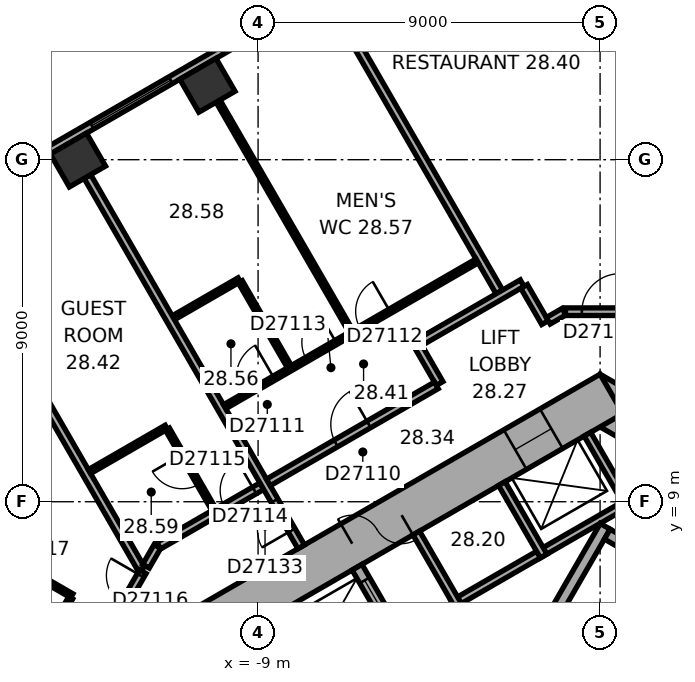
"""IFC4 building model, lengths in metres.
Left out: names, types, materials, properties, quantities, classifications, styles, units other than length and angle.
Written with IfcOpenShell. Run it as: python <this file> out.ifc"""

import sys

from ifc_helpers import new_model, si_unit, direction, frame, frame_2d, origin, origin_2d, place, context, subcontext, project, spatial, rectangle, extrude, element, fill, save


model = new_model("IFC4")
c1 = context("Model", 3, precision=1e-05, world=origin(), true_north=direction((0.0, 1.0)))
c2 = subcontext(c1, "Body", "Model", "MODEL_VIEW")
j1 = project(units=[si_unit("LENGTHUNIT", "METRE"), si_unit("PLANEANGLEUNIT", "RADIAN")], contexts=[c1])
p1 = place(None, origin())
s1 = spatial("IfcSite", under=j1, at=p1, CompositionType="ELEMENT")
p2 = place(p1, origin())
s2 = spatial("IfcBuilding", under=s1, at=p2, CompositionType="ELEMENT")
p3 = place(p2, frame((0.0, 0.0, 116.6)))
s3 = spatial("IfcBuildingStorey", under=s2, at=p3, CompositionType="ELEMENT", Elevation=116.6)
for number, where, z_axis, x_axis in (
    (1, (-10.333, 19.957, 0.0), (0.0, 0.0, 1.0), (-0.866, -0.5, 0.0)),
    (2, (-13.74, 17.99, 0.0), (0.0, 0.0, 1.0), (-0.866, -0.5, 0.0)),
):
    element("IfcColumn", number, at=place(p3, frame(where, z_axis=z_axis, x_axis=x_axis)), inside=s3, PredefinedType="COLUMN", context=c2, shape_type="SweptSolid", body=[
        extrude(rectangle(XDim=1.1, YDim=1.0, at=origin_2d()), origin(), (0.0, 0.0, 1.0), 3.3),
    ])
p4 = place(p3, frame((10.4, 5.658, 0.0), z_axis=(0.0, 0.0, 1.0), x_axis=(-0.866021384402, 0.500006961711, 0.0)))
e3 = element("IfcWall", 3, at=p4, inside=s3, PredefinedType="SHEAR", context=c2, shape_type="SweptSolid", body=[
    extrude(rectangle(XDim=12.355, YDim=1.2, at=frame_2d((6.178, 0.0))), origin(), (0.0, 0.0, 1.0), 3.3),
])
p5 = place(p4, frame((2.728, 0.0, 0.0)))
e4 = element("IfcOpeningElement", 4, at=p5, cuts=e3, PredefinedType="OPENING", context=c2, shape_type="SweptSolid", body=[
    extrude(rectangle(XDim=1.1, YDim=2.1, at=frame_2d((0.55, 1.05))), frame((0.0, 0.61, 0.0), z_axis=(0.0, -1.0, 0.0), x_axis=(1.0, 0.0, 0.0)), (0.0, 0.0, 1.0), 1.22),
])
p6 = place(p4, frame((5.328, 0.0, 0.0)))
e5 = element("IfcOpeningElement", 5, at=p6, cuts=e3, PredefinedType="OPENING", context=c2, shape_type="SweptSolid", body=[
    extrude(rectangle(XDim=1.1, YDim=2.1, at=frame_2d((0.55, 1.05))), frame((0.0, 0.61, 0.0), z_axis=(0.0, -1.0, 0.0), x_axis=(1.0, 0.0, 0.0)), (0.0, 0.0, 1.0), 1.22),
])
p7 = place(p4, frame((7.928, 0.0, 0.0)))
e6 = element("IfcOpeningElement", 6, at=p7, cuts=e3, PredefinedType="OPENING", context=c2, shape_type="SweptSolid", body=[
    extrude(rectangle(XDim=1.1, YDim=2.1, at=frame_2d((0.55, 1.05))), frame((0.0, 0.61, 0.0), z_axis=(0.0, -1.0, 0.0), x_axis=(1.0, 0.0, 0.0)), (0.0, 0.0, 1.0), 1.22),
])
p8 = place(p3, frame((0.3, 11.836, 0.0), z_axis=(0.0, 0.0, 1.0), x_axis=(-0.866021384402, -0.500006961711, 0.0)))
e7 = element("IfcWall", 7, at=p8, inside=s3, PredefinedType="SHEAR", context=c2, shape_type="SweptSolid", body=[
    extrude(rectangle(XDim=12.355, YDim=1.2, at=frame_2d((6.178, 0.0))), origin(), (0.0, 0.0, 1.0), 3.3),
])
p9 = place(p8, frame((6.378, 0.0, 0.0)))
e8 = element("IfcOpeningElement", 8, at=p9, cuts=e7, PredefinedType="OPENING", context=c2, shape_type="SweptSolid", body=[
    extrude(rectangle(XDim=1.5, YDim=2.1, at=frame_2d((0.75, 1.05))), frame((0.0, 0.61, 0.0), z_axis=(0.0, -1.0, 0.0), x_axis=(1.0, 0.0, 0.0)), (0.0, 0.0, 1.0), 1.22),
])
p10 = place(p8, frame((1.828, 0.0, 0.0)))
e9 = element("IfcOpeningElement", 9, at=p10, cuts=e7, PredefinedType="OPENING", context=c2, shape_type="SweptSolid", body=[
    extrude(rectangle(XDim=1.1, YDim=2.1, at=frame_2d((0.55, 1.05))), frame((0.0, 0.61, 0.0), z_axis=(0.0, -1.0, 0.0), x_axis=(1.0, 0.0, 0.0)), (0.0, 0.0, 1.0), 1.22),
])
p11 = place(p3, frame((-3.136, 24.805, 0.0), z_axis=(0.0, 0.0, 1.0), x_axis=(-0.866028291626, -0.499994998079, 0.0)))
e10 = element("IfcWall", 10, at=p11, inside=s3, PredefinedType="STANDARD", context=c2, shape_type="SweptSolid", body=[
    extrude(rectangle(XDim=21.246, YDim=0.2, at=frame_2d((10.623, 0.0))), origin(), (0.0, 0.0, 1.0), 3.3),
])
p12 = place(p11, frame((1.555, 0.0, 0.8)))
e11 = element("IfcOpeningElement", 11, at=p12, cuts=e10, PredefinedType="OPENING", context=c2, shape_type="SweptSolid", body=[
    extrude(rectangle(XDim=2.4, YDim=1.7, at=frame_2d((1.2, 0.85))), frame((0.0, 0.11, 0.0), z_axis=(0.0, -1.0, 0.0), x_axis=(1.0, 0.0, 0.0)), (0.0, 0.0, 1.0), 0.22),
])
p13 = place(p11, frame((5.489, 0.0, 0.8)))
e12 = element("IfcOpeningElement", 12, at=p13, cuts=e10, PredefinedType="OPENING", context=c2, shape_type="SweptSolid", body=[
    extrude(rectangle(XDim=2.4, YDim=1.7, at=frame_2d((1.2, 0.85))), frame((0.0, 0.11, 0.0), z_axis=(0.0, -1.0, 0.0), x_axis=(1.0, 0.0, 0.0)), (0.0, 0.0, 1.0), 0.22),
])
p14 = place(p11, frame((9.424, 0.0, 0.8)))
e13 = element("IfcOpeningElement", 13, at=p14, cuts=e10, PredefinedType="OPENING", context=c2, shape_type="SweptSolid", body=[
    extrude(rectangle(XDim=2.4, YDim=1.7, at=frame_2d((1.2, 0.85))), frame((0.0, 0.11, 0.0), z_axis=(0.0, -1.0, 0.0), x_axis=(1.0, 0.0, 0.0)), (0.0, 0.0, 1.0), 0.22),
])
p15 = place(p11, frame((13.358, 0.0, 0.8)))
e14 = element("IfcOpeningElement", 14, at=p15, cuts=e10, PredefinedType="OPENING", context=c2, shape_type="SweptSolid", body=[
    extrude(rectangle(XDim=2.4, YDim=1.7, at=frame_2d((1.2, 0.85))), frame((0.0, 0.11, 0.0), z_axis=(0.0, -1.0, 0.0), x_axis=(1.0, 0.0, 0.0)), (0.0, 0.0, 1.0), 0.22),
])
p16 = place(p11, frame((17.293, 0.0, 0.8)))
e15 = element("IfcOpeningElement", 15, at=p16, cuts=e10, PredefinedType="OPENING", context=c2, shape_type="SweptSolid", body=[
    extrude(rectangle(XDim=2.4, YDim=1.7, at=frame_2d((1.2, 0.85))), frame((0.0, 0.11, 0.0), z_axis=(0.0, -1.0, 0.0), x_axis=(1.0, 0.0, 0.0)), (0.0, 0.0, 1.0), 0.22),
])
p17 = place(p3, frame((0.803, 9.009, 0.0), z_axis=(0.0, 0.0, 1.0), x_axis=(-0.866028230842, -0.499995103361, 0.0)))
e16 = element("IfcWall", 16, at=p17, inside=s3, PredefinedType="PARTITIONING", context=c2, shape_type="SweptSolid", body=[
    extrude(rectangle(XDim=5.4, YDim=0.2, at=frame_2d((2.7, 0.0))), origin(), (0.0, 0.0, 1.0), 2.95),
])
p18 = place(p3, frame((0.767, 8.872, 0.0), z_axis=(0.0, 0.0, 1.0), x_axis=(-0.499994660107, 0.866028486751, 0.0)))
e17 = element("IfcWall", 17, at=p18, inside=s3, PredefinedType="PARTITIONING", context=c2, shape_type="SweptSolid", body=[
    extrude(rectangle(XDim=2.2, YDim=0.2, at=frame_2d((1.1, 0.0))), origin(), (0.0, 0.0, 1.0), 2.95),
])
for number, where, z_axis, x_axis in (
    (18, (-1.485, 7.572, 0.0), (0.0, 0.0, 1.0), (-0.5, 0.866, 0.0)),
    (19, (-3.737, 6.272, 0.0), (0.0, 0.0, 1.0), (-0.5, 0.866, 0.0)),
):
    element("IfcWall", number, at=place(p3, frame(where, z_axis=z_axis, x_axis=x_axis)), inside=s3, PredefinedType="PARTITIONING", context=c2, shape_type="SweptSolid", body=[
        extrude(rectangle(XDim=2.2, YDim=0.2, at=frame_2d((1.1, 0.0))), origin(), (0.0, 0.0, 1.0), 2.95),
    ])
p19 = place(p3, frame((-2.216, 4.282, 0.0), z_axis=(0.0, 0.0, 1.0), x_axis=(0.499977259774, 0.866038532462, 0.0)))
e20 = element("IfcWall", 20, at=p19, inside=s3, PredefinedType="SHEAR", context=c2, shape_type="SweptSolid", body=[
    extrude(rectangle(XDim=4.7, YDim=0.3, at=frame_2d((2.35, 0.0))), origin(), (0.0, 0.0, 1.0), 2.95),
])
p20 = place(p3, frame((6.303, 4.617, 0.0), z_axis=(0.0, 0.0, 1.0), x_axis=(-0.866027801685, 0.499995846692, 0.0)))
e21 = element("IfcWall", 21, at=p20, inside=s3, PredefinedType="SHEAR", context=c2, shape_type="SweptSolid", body=[
    extrude(rectangle(XDim=7.06, YDim=0.3, at=frame_2d((3.53, 0.0))), origin(), (0.0, 0.0, 1.0), 2.95),
])
p21 = place(p3, frame((-5.295, 5.372, 0.0), z_axis=(0.0, 0.0, 1.0), x_axis=(-0.500077893725, 0.86598042715, 0.0)))
e22 = element("IfcWall", 22, at=p21, inside=s3, PredefinedType="SHEAR", context=c2, shape_type="SweptSolid", body=[
    extrude(rectangle(XDim=2.2, YDim=0.3, at=frame_2d((1.1, 0.0))), origin(), (0.0, 0.0, 1.0), 2.95),
])
p22 = place(p21, frame((0.7, 0.0, 0.0)))
e23 = element("IfcOpeningElement", 23, at=p22, cuts=e22, PredefinedType="OPENING", context=c2, shape_type="SweptSolid", body=[
    extrude(rectangle(XDim=1.1, YDim=2.1, at=frame_2d((0.55, 1.05))), frame((0.0, 0.16, 0.0), z_axis=(0.0, -1.0, 0.0), x_axis=(1.0, 0.0, 0.0)), (0.0, 0.0, 1.0), 0.32),
])
p23 = place(p3, frame((-16.898, 15.59, 0.0), z_axis=(0.0, 0.0, 1.0), x_axis=(0.499994742786, -0.866028439017, 0.0)))
e24 = element("IfcWall", 24, at=p23, inside=s3, PredefinedType="PARTITIONING", context=c2, shape_type="SweptSolid", body=[
    extrude(rectangle(XDim=9.65, YDim=0.2, at=frame_2d((4.825, 0.0))), origin(), (0.0, 0.0, 1.0), 2.95),
])
p24 = place(p3, frame((-16.533, 8.044, 0.0), z_axis=(0.0, 0.0, 1.0), x_axis=(0.86601037836, -0.500026023896, 0.0)))
e25 = element("IfcWall", 25, at=p24, inside=s3, PredefinedType="PARTITIONING", context=c2, shape_type="SweptSolid", body=[
    extrude(rectangle(XDim=3.04, YDim=0.12, at=frame_2d((1.52, 0.0))), origin(), (0.0, 0.0, 1.0), 2.95),
])
p25 = place(p24, frame((1.07, 0.0, 0.0)))
e26 = element("IfcOpeningElement", 26, at=p25, cuts=e25, PredefinedType="OPENING", context=c2, shape_type="SweptSolid", body=[
    extrude(rectangle(XDim=0.9, YDim=2.1, at=frame_2d((0.45, 1.05))), frame((0.0, 0.07, 0.0), z_axis=(0.0, -1.0, 0.0), x_axis=(1.0, 0.0, 0.0)), (0.0, 0.0, 1.0), 0.14),
])
p26 = place(p3, frame((-13.931, 6.472, 0.0), z_axis=(0.0, 0.0, 1.0), x_axis=(-0.499739399214, -0.866175809448, 0.0)))
e27 = element("IfcWall", 27, at=p26, inside=s3, PredefinedType="PARTITIONING", context=c2, shape_type="SweptSolid", body=[
    extrude(rectangle(XDim=0.416, YDim=0.12, at=frame_2d((0.208, 0.0))), origin(), (0.0, 0.0, 1.0), 2.95),
])
p27 = place(p3, frame((-13.436, 9.794, 0.0), z_axis=(0.0, 0.0, 1.0), x_axis=(0.866053246676, 0.499951771596, 0.0)))
e28 = element("IfcWall", 28, at=p27, inside=s3, PredefinedType="PARTITIONING", context=c2, shape_type="SweptSolid", body=[
    extrude(rectangle(XDim=2.335, YDim=0.12, at=frame_2d((1.167, 0.0))), origin(), (0.0, 0.0, 1.0), 2.95),
])
p28 = place(p3, frame((-12.032, 7.162, 0.0), z_axis=(0.0, 0.0, 1.0), x_axis=(-0.499951829968, -0.866053212979, 0.0)))
e29 = element("IfcWall", 29, at=p28, inside=s3, PredefinedType="PARTITIONING", context=c2, shape_type="SweptSolid", body=[
    extrude(rectangle(XDim=1.136, YDim=0.2, at=frame_2d((0.568, 0.0))), origin(), (0.0, 0.0, 1.0), 2.95),
])
p29 = place(p28, frame((0.118, 0.0, 0.0)))
e30 = element("IfcOpeningElement", 30, at=p29, cuts=e29, PredefinedType="OPENING", context=c2, shape_type="SweptSolid", body=[
    extrude(rectangle(XDim=0.9, YDim=2.1, at=frame_2d((0.45, 1.05))), frame((0.0, 0.11, 0.0), z_axis=(0.0, -1.0, 0.0), x_axis=(1.0, 0.0, 0.0)), (0.0, 0.0, 1.0), 0.22),
])
p30 = place(p3, frame((-11.65, 7.823, 0.0), z_axis=(0.0, 0.0, 1.0), x_axis=(-0.50012165622, -0.865955154139, 0.0)))
e31 = element("IfcWall", 31, at=p30, inside=s3, PredefinedType="PARTITIONING", context=c2, shape_type="SweptSolid", body=[
    extrude(rectangle(XDim=0.6, YDim=0.2, at=frame_2d((0.3, 0.0))), origin(), (0.0, 0.0, 1.0), 2.95),
])
p31 = place(p3, frame((-11.385, 10.909, 0.0), z_axis=(0.0, 0.0, 1.0), x_axis=(0.500077547548, -0.865980627057, 0.0)))
e32 = element("IfcWall", 32, at=p31, inside=s3, PredefinedType="PARTITIONING", context=c2, shape_type="SweptSolid", body=[
    extrude(rectangle(XDim=2.44, YDim=0.12, at=frame_2d((1.22, 0.0))), origin(), (0.0, 0.0, 1.0), 2.95),
])
p32 = place(p31, frame((0.77, 0.0, 0.0)))
e33 = element("IfcOpeningElement", 33, at=p32, cuts=e32, PredefinedType="OPENING", context=c2, shape_type="SweptSolid", body=[
    extrude(rectangle(XDim=0.9, YDim=2.1, at=frame_2d((0.45, 1.05))), frame((0.0, 0.07, 0.0), z_axis=(0.0, -1.0, 0.0), x_axis=(1.0, 0.0, 0.0)), (0.0, 0.0, 1.0), 0.14),
])
p33 = place(p3, frame((-10.053, 19.542, 0.0), z_axis=(0.0, 0.0, 1.0), x_axis=(0.49998952364, -0.866031452229, 0.0)))
e34 = element("IfcWall", 34, at=p33, inside=s3, PredefinedType="PARTITIONING", context=c2, shape_type="SweptSolid", body=[
    extrude(rectangle(XDim=6.99, YDim=0.12, at=frame_2d((3.495, 0.0))), origin(), (0.0, 0.0, 1.0), 2.15),
])
p34 = place(p3, frame((-9.497, 14.84, 0.0), z_axis=(0.0, 0.0, 1.0), x_axis=(-0.866041268327, -0.499972520799, 0.0)))
e35 = element("IfcWall", 35, at=p34, inside=s3, PredefinedType="PARTITIONING", context=c2, shape_type="SweptSolid", body=[
    extrude(rectangle(XDim=2.0, YDim=0.12, at=frame_2d((1.0, 0.0))), origin(), (0.0, 0.0, 1.0), 2.95),
])
p35 = place(p3, frame((-8.902, 9.41, 0.0), z_axis=(0.0, 0.0, 1.0), x_axis=(-0.866014299198, -0.500019233215, 0.0)))
e36 = element("IfcWall", 36, at=p35, inside=s3, PredefinedType="PARTITIONING", context=c2, shape_type="SweptSolid", body=[
    extrude(rectangle(XDim=3.133, YDim=0.2, at=frame_2d((1.567, 0.0))), origin(), (0.0, 0.0, 1.0), 2.95),
])
p36 = place(p35, frame((0.225, 0.0, 0.0)))
e37 = element("IfcOpeningElement", 37, at=p36, cuts=e36, PredefinedType="OPENING", context=c2, shape_type="SweptSolid", body=[
    extrude(rectangle(XDim=0.9, YDim=2.1, at=frame_2d((0.45, 1.05))), frame((0.0, 0.11, 0.0), z_axis=(0.0, -1.0, 0.0), x_axis=(1.0, 0.0, 0.0)), (0.0, 0.0, 1.0), 0.22),
])
p37 = place(p3, frame((-8.177, 12.553, 0.0), z_axis=(0.0, 0.0, 1.0), x_axis=(-0.500006411147, 0.866021702275, 0.0)))
e38 = element("IfcWall", 38, at=p37, inside=s3, PredefinedType="PARTITIONING", context=c2, shape_type="SweptSolid", body=[
    extrude(rectangle(XDim=2.58, YDim=0.12, at=frame_2d((1.29, 0.0))), origin(), (0.0, 0.0, 1.0), 2.95),
])
p38 = place(p3, frame((-7.865, 7.814, 0.0), z_axis=(0.0, 0.0, 1.0), x_axis=(-0.500004234368, 0.866022959057, 0.0)))
e39 = element("IfcWall", 39, at=p38, inside=s3, PredefinedType="PARTITIONING", context=c2, shape_type="SweptSolid", body=[
    extrude(rectangle(XDim=11.25, YDim=0.2, at=frame_2d((5.625, 0.0))), origin(), (0.0, 0.0, 1.0), 2.95),
])
p39 = place(p38, frame((0.5, 0.0, 0.0)))
e40 = element("IfcOpeningElement", 40, at=p39, cuts=e39, PredefinedType="OPENING", context=c2, shape_type="SweptSolid", body=[
    extrude(rectangle(XDim=0.9, YDim=2.1, at=frame_2d((0.45, 1.05))), frame((0.0, 0.11, 0.0), z_axis=(0.0, -1.0, 0.0), x_axis=(1.0, 0.0, 0.0)), (0.0, 0.0, 1.0), 0.22),
])
p40 = place(p3, frame((-6.676, 21.492, 0.0), z_axis=(0.0, 0.0, 1.0), x_axis=(0.500011263043, -0.866018900966, 0.0)))
e41 = element("IfcWall", 41, at=p40, inside=s3, PredefinedType="PARTITIONING", context=c2, shape_type="SweptSolid", body=[
    extrude(rectangle(XDim=8.049, YDim=0.2, at=frame_2d((4.024, 0.0))), origin(), (0.0, 0.0, 1.0), 2.95),
])
p41 = place(p3, frame((-4.823, 13.152, 0.0), z_axis=(0.0, 0.0, 1.0), x_axis=(0.499986357472, -0.866033280158, 0.0)))
e42 = element("IfcWall", 42, at=p41, inside=s3, PredefinedType="PARTITIONING", context=c2, shape_type="SweptSolid", body=[
    extrude(rectangle(XDim=1.201, YDim=0.2, at=frame_2d((0.601, 0.0))), origin(), (0.0, 0.0, 1.0), 2.95),
])
p42 = place(p3, frame((-4.309, 12.061, 0.0), z_axis=(0.0, 0.0, 1.0), x_axis=(-0.866020679205, -0.500008183122, 0.0)))
e43 = element("IfcWall", 43, at=p42, inside=s3, PredefinedType="PARTITIONING", context=c2, shape_type="SweptSolid", body=[
    extrude(rectangle(XDim=5.104, YDim=0.2, at=frame_2d((2.552, 0.0))), origin(), (0.0, 0.0, 1.0), 2.95),
])
p43 = place(p42, frame((2.052, 0.0, 0.0)))
e44 = element("IfcOpeningElement", 44, at=p43, cuts=e43, PredefinedType="OPENING", context=c2, shape_type="SweptSolid", body=[
    extrude(rectangle(XDim=1.0, YDim=2.1, at=frame_2d((0.5, 1.05))), frame((0.0, 0.11, 0.0), z_axis=(0.0, -1.0, 0.0), x_axis=(1.0, 0.0, 0.0)), (0.0, 0.0, 1.0), 0.22),
])
p44 = place(p3, frame((-3.237, 15.336, 0.0), z_axis=(0.0, 0.0, 1.0), x_axis=(-0.866022840924, -0.500004438978, 0.0)))
e45 = element("IfcWall", 45, at=p44, inside=s3, PredefinedType="PARTITIONING", context=c2, shape_type="SweptSolid", body=[
    extrude(rectangle(XDim=7.669, YDim=0.12, at=frame_2d((3.835, 0.0))), origin(), (0.0, 0.0, 1.0), 2.95),
])
p45 = place(p44, frame((6.169, 0.0, 0.0)))
e46 = element("IfcOpeningElement", 46, at=p45, cuts=e45, PredefinedType="OPENING", context=c2, shape_type="SweptSolid", body=[
    extrude(rectangle(XDim=1.0, YDim=2.1, at=frame_2d((0.5, 1.05))), frame((0.0, 0.07, 0.0), z_axis=(0.0, -1.0, 0.0), x_axis=(1.0, 0.0, 0.0)), (0.0, 0.0, 1.0), 0.14),
])
p46 = place(p44, frame((2.65, 0.0, 0.0)))
e47 = element("IfcOpeningElement", 47, at=p46, cuts=e45, PredefinedType="OPENING", context=c2, shape_type="SweptSolid", body=[
    extrude(rectangle(XDim=0.9, YDim=2.1, at=frame_2d((0.45, 1.05))), frame((0.0, 0.07, 0.0), z_axis=(0.0, -1.0, 0.0), x_axis=(1.0, 0.0, 0.0)), (0.0, 0.0, 1.0), 0.14),
])
p47 = place(p44, frame((4.285, 0.0, 0.0)))
e48 = element("IfcOpeningElement", 48, at=p47, cuts=e45, PredefinedType="OPENING", context=c2, shape_type="SweptSolid", body=[
    extrude(rectangle(XDim=0.9, YDim=2.1, at=frame_2d((0.45, 1.05))), frame((0.0, 0.07, 0.0), z_axis=(0.0, -1.0, 0.0), x_axis=(1.0, 0.0, 0.0)), (0.0, 0.0, 1.0), 0.14),
])
p48 = place(p3, frame((-2.05, 14.752, 0.0), z_axis=(0.0, 0.0, 1.0), x_axis=(-0.866030936828, -0.499990416364, 0.0)))
e49 = element("IfcWall", 49, at=p48, inside=s3, PredefinedType="PARTITIONING", context=c2, shape_type="SweptSolid", body=[
    extrude(rectangle(XDim=3.102, YDim=0.2, at=frame_2d((1.551, 0.0))), origin(), (0.0, 0.0, 1.0), 2.95),
])
p49 = place(p3, frame((-1.449, 13.712, 0.0), z_axis=(0.0, 0.0, 1.0), x_axis=(-0.499978356969, 0.866037899034, 0.0)))
e50 = element("IfcWall", 50, at=p49, inside=s3, PredefinedType="PARTITIONING", context=c2, shape_type="SweptSolid", body=[
    extrude(rectangle(XDim=1.101, YDim=0.2, at=frame_2d((0.551, 0.0))), origin(), (0.0, 0.0, 1.0), 2.95),
])
p50 = place(p3, frame((-0.95, 14.001, 0.0), z_axis=(0.0, 0.0, 1.0), x_axis=(-0.86609177584, -0.499885022602, 0.0)))
e51 = element("IfcWall", 51, at=p50, inside=s3, PredefinedType="PARTITIONING", context=c2, shape_type="SweptSolid", body=[
    extrude(rectangle(XDim=0.477, YDim=0.2, at=frame_2d((0.238, 0.0))), origin(), (0.0, 0.0, 1.0), 2.95),
])
p51 = place(p3, frame((0.95, 14.001, 0.0), z_axis=(0.0, 0.0, 1.0), x_axis=(-1.0, 0.0, 0.0)))
e52 = element("IfcWall", 52, at=p51, inside=s3, PredefinedType="PARTITIONING", context=c2, shape_type="SweptSolid", body=[
    extrude(rectangle(XDim=1.86, YDim=0.2, at=frame_2d((0.93, 0.0))), origin(), (0.0, 0.0, 1.0), 2.95),
])
p52 = place(p51, frame((0.43, 0.0, 0.0)))
e53 = element("IfcOpeningElement", 53, at=p52, cuts=e52, PredefinedType="OPENING", context=c2, shape_type="SweptSolid", body=[
    extrude(rectangle(XDim=1.0, YDim=2.1, at=frame_2d((0.5, 1.05))), frame((0.0, 0.11, 0.0), z_axis=(0.0, -1.0, 0.0), x_axis=(1.0, 0.0, 0.0)), (0.0, 0.0, 1.0), 0.22),
])
p53 = place(p14, origin())
e54 = element("IfcWindow", 54, at=p53, inside=s3, PartitioningType="SINGLE_PANEL", PredefinedType="WINDOW", context=c2, shape_type="SweptSolid", body=[
    extrude(rectangle(XDim=2.4, YDim=1.7, at=frame_2d((1.2, 0.85))), frame((0.0, 0.03, 0.0), z_axis=(0.0, -1.0, 0.0), x_axis=(1.0, 0.0, 0.0)), (0.0, 0.0, 1.0), 0.06),
])
fill(e13, e54)
p54 = place(p9, origin())
e55 = element("IfcDoor", 55, at=p54, inside=s3, OperationType="DOUBLE_DOOR_SINGLE_SWING", PredefinedType="DOOR", context=c2, shape_type="SweptSolid", body=[
    extrude(rectangle(XDim=1.5, YDim=2.1, at=frame_2d((0.75, 1.05))), frame((0.0, 0.025, 0.0), z_axis=(0.0, -1.0, 0.0), x_axis=(1.0, 0.0, 0.0)), (0.0, 0.0, 1.0), 0.05),
])
fill(e8, e55)
p55 = place(p22, origin())
e56 = element("IfcDoor", 56, at=p55, inside=s3, OperationType="DOUBLE_DOOR_SLIDING", PredefinedType="DOOR", context=c2, shape_type="SweptSolid", body=[
    extrude(rectangle(XDim=1.1, YDim=2.1, at=frame_2d((0.55, 1.05))), frame((0.0, 0.025, 0.0), z_axis=(0.0, -1.0, 0.0), x_axis=(1.0, 0.0, 0.0)), (0.0, 0.0, 1.0), 0.05),
])
fill(e23, e56)
p56 = place(p10, origin())
e57 = element("IfcDoor", 57, at=p56, inside=s3, OperationType="DOUBLE_DOOR_SLIDING", PredefinedType="DOOR", context=c2, shape_type="SweptSolid", body=[
    extrude(rectangle(XDim=1.1, YDim=2.1, at=frame_2d((0.55, 1.05))), frame((0.0, 0.025, 0.0), z_axis=(0.0, -1.0, 0.0), x_axis=(1.0, 0.0, 0.0)), (0.0, 0.0, 1.0), 0.05),
])
fill(e9, e57)
p57 = place(p52, origin())
e58 = element("IfcDoor", 58, at=p57, inside=s3, OperationType="SINGLE_SWING_LEFT", PredefinedType="DOOR", context=c2, shape_type="SweptSolid", body=[
    extrude(rectangle(XDim=1.0, YDim=2.1, at=frame_2d((0.5, 1.05))), frame((0.0, 0.025, 0.0), z_axis=(0.0, -1.0, 0.0), x_axis=(1.0, 0.0, 0.0)), (0.0, 0.0, 1.0), 0.05),
])
fill(e53, e58)
p58 = place(p43, origin())
e59 = element("IfcDoor", 59, at=p58, inside=s3, OperationType="SINGLE_SWING_LEFT", PredefinedType="DOOR", context=c2, shape_type="SweptSolid", body=[
    extrude(rectangle(XDim=1.0, YDim=2.1, at=frame_2d((0.5, 1.05))), frame((0.0, 0.025, 0.0), z_axis=(0.0, -1.0, 0.0), x_axis=(1.0, 0.0, 0.0)), (0.0, 0.0, 1.0), 0.05),
])
fill(e44, e59)
p59 = place(p45, origin())
e60 = element("IfcDoor", 60, at=p59, inside=s3, OperationType="SINGLE_SWING_LEFT", PredefinedType="DOOR", context=c2, shape_type="SweptSolid", body=[
    extrude(rectangle(XDim=1.0, YDim=2.1, at=frame_2d((0.5, 1.05))), frame((0.0, 0.025, 0.0), z_axis=(0.0, -1.0, 0.0), x_axis=(1.0, 0.0, 0.0)), (0.0, 0.0, 1.0), 0.05),
])
fill(e46, e60)
p60 = place(p46, origin())
e61 = element("IfcDoor", 61, at=p60, inside=s3, OperationType="SINGLE_SWING_LEFT", PredefinedType="DOOR", context=c2, shape_type="SweptSolid", body=[
    extrude(rectangle(XDim=0.9, YDim=2.1, at=frame_2d((0.45, 1.05))), frame((0.0, 0.025, 0.0), z_axis=(0.0, -1.0, 0.0), x_axis=(1.0, 0.0, 0.0)), (0.0, 0.0, 1.0), 0.05),
])
fill(e47, e61)
p61 = place(p47, origin())
e62 = element("IfcDoor", 62, at=p61, inside=s3, OperationType="SINGLE_SWING_LEFT", PredefinedType="DOOR", context=c2, shape_type="SweptSolid", body=[
    extrude(rectangle(XDim=0.9, YDim=2.1, at=frame_2d((0.45, 1.05))), frame((0.0, 0.025, 0.0), z_axis=(0.0, -1.0, 0.0), x_axis=(1.0, 0.0, 0.0)), (0.0, 0.0, 1.0), 0.05),
])
fill(e48, e62)
p62 = place(p36, origin())
e63 = element("IfcDoor", 63, at=p62, inside=s3, OperationType="SINGLE_SWING_LEFT", PredefinedType="DOOR", context=c2, shape_type="SweptSolid", body=[
    extrude(rectangle(XDim=0.9, YDim=2.1, at=frame_2d((0.45, 1.05))), frame((0.0, 0.025, 0.0), z_axis=(0.0, -1.0, 0.0), x_axis=(1.0, 0.0, 0.0)), (0.0, 0.0, 1.0), 0.05),
])
fill(e37, e63)
p63 = place(p32, origin())
e64 = element("IfcDoor", 64, at=p63, inside=s3, OperationType="SINGLE_SWING_LEFT", PredefinedType="DOOR", context=c2, shape_type="SweptSolid", body=[
    extrude(rectangle(XDim=0.9, YDim=2.1, at=frame_2d((0.45, 1.05))), frame((0.0, 0.025, 0.0), z_axis=(0.0, -1.0, 0.0), x_axis=(1.0, 0.0, 0.0)), (0.0, 0.0, 1.0), 0.05),
])
fill(e33, e64)
p64 = place(p29, origin())
e65 = element("IfcDoor", 65, at=p64, inside=s3, OperationType="SINGLE_SWING_LEFT", PredefinedType="DOOR", context=c2, shape_type="SweptSolid", body=[
    extrude(rectangle(XDim=0.9, YDim=2.1, at=frame_2d((0.45, 1.05))), frame((0.0, 0.025, 0.0), z_axis=(0.0, -1.0, 0.0), x_axis=(1.0, 0.0, 0.0)), (0.0, 0.0, 1.0), 0.05),
])
fill(e30, e65)
p65 = place(p39, origin())
e66 = element("IfcDoor", 66, at=p65, inside=s3, OperationType="SINGLE_SWING_LEFT", PredefinedType="DOOR", context=c2, shape_type="SweptSolid", body=[
    extrude(rectangle(XDim=0.9, YDim=2.1, at=frame_2d((0.45, 1.05))), frame((0.0, 0.025, 0.0), z_axis=(0.0, -1.0, 0.0), x_axis=(1.0, 0.0, 0.0)), (0.0, 0.0, 1.0), 0.05),
])
fill(e40, e66)
save(model, sys.argv[1])
